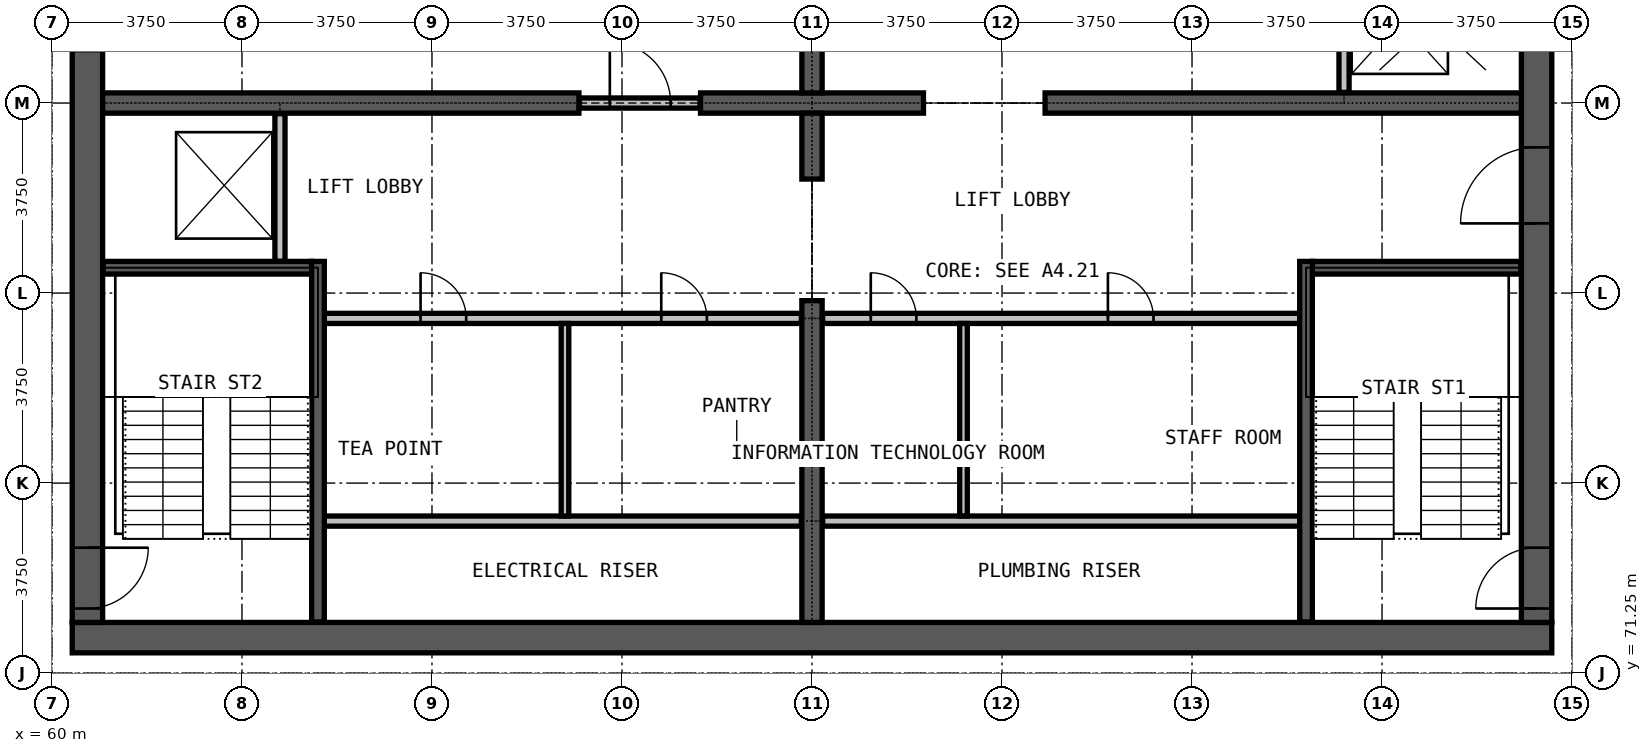
"""IFC4 building model, lengths in metres.
Left out: names, types, materials, properties, quantities, classifications, styles, units other than length and angle.
Written with IfcOpenShell. Run it as: python <this file> out.ifc"""

import sys

from ifc_helpers import new_model, si_unit, direction, frame, frame_2d, origin, place, context, subcontext, project, spatial, rectangle, extrude, element, fill, save


model = new_model("IFC4")
c1 = context("Model", 3, precision=1e-05, world=origin(), true_north=direction((0.0, 1.0)))
c2 = subcontext(c1, "Body", "Model", "MODEL_VIEW")
j1 = project(units=[si_unit("LENGTHUNIT", "METRE"), si_unit("PLANEANGLEUNIT", "RADIAN")], contexts=[c1])
p1 = place(None, origin())
s1 = spatial("IfcSite", under=j1, at=p1, CompositionType="ELEMENT")
p2 = place(p1, origin())
s2 = spatial("IfcBuilding", under=s1, at=p2, CompositionType="ELEMENT")
p3 = place(p2, frame((0.0, 0.0, 246.3)))
s3 = spatial("IfcBuildingStorey", under=s2, at=p3, CompositionType="ELEMENT", Elevation=246.3)
p4 = place(p3, frame((60.4, 71.95, 0.0), z_axis=(0.0, 0.0, 1.0), x_axis=(1.0, 0.0, 0.0)))
e1 = element("IfcWall", 1, at=p4, inside=s3, PredefinedType="SHEAR", context=c2, shape_type="SweptSolid", body=[
    extrude(rectangle(XDim=29.2, YDim=0.6, at=frame_2d((14.6, 0.0))), origin(), (0.0, 0.0, 1.0), 3.6),
])
p5 = place(p3, frame((89.3, 72.25, 0.0), z_axis=(0.0, 0.0, 1.0), x_axis=(0.0, 1.0, 0.0)))
e2 = element("IfcWall", 2, at=p5, inside=s3, PredefinedType="SHEAR", context=c2, shape_type="SweptSolid", body=[
    extrude(rectangle(XDim=20.5, YDim=0.6, at=frame_2d((10.25, 0.0))), origin(), (0.0, 0.0, 1.0), 3.6),
])
p6 = place(p5, frame((0.275, 0.0, 0.0)))
e3 = element("IfcOpeningElement", 3, at=p6, cuts=e2, PredefinedType="OPENING", context=c2, shape_type="SweptSolid", body=[
    extrude(rectangle(XDim=1.2, YDim=2.2, at=frame_2d((0.6, 1.1))), frame((0.0, 0.31, 0.0), z_axis=(0.0, -1.0, 0.0), x_axis=(1.0, 0.0, 0.0)), (0.0, 0.0, 1.0), 0.62),
])
p7 = place(p5, frame((13.775, 0.0, 0.0)))
e4 = element("IfcOpeningElement", 4, at=p7, cuts=e2, PredefinedType="OPENING", context=c2, shape_type="SweptSolid", body=[
    extrude(rectangle(XDim=1.2, YDim=2.2, at=frame_2d((0.6, 1.1))), frame((0.0, 0.31, 0.0), z_axis=(0.0, -1.0, 0.0), x_axis=(1.0, 0.0, 0.0)), (0.0, 0.0, 1.0), 0.62),
])
p8 = place(p5, frame((7.875, 0.0, 0.0)))
e5 = element("IfcOpeningElement", 5, at=p8, cuts=e2, PredefinedType="OPENING", context=c2, shape_type="SweptSolid", body=[
    extrude(rectangle(XDim=1.5, YDim=2.2, at=frame_2d((0.75, 1.1))), frame((0.0, 0.31, 0.0), z_axis=(0.0, -1.0, 0.0), x_axis=(1.0, 0.0, 0.0)), (0.0, 0.0, 1.0), 0.62),
])
p9 = place(p3, frame((60.7, 92.75, 0.0), z_axis=(0.0, 0.0, 1.0), x_axis=(0.0, -1.0, 0.0)))
e6 = element("IfcWall", 6, at=p9, inside=s3, PredefinedType="SHEAR", context=c2, shape_type="SweptSolid", body=[
    extrude(rectangle(XDim=20.5, YDim=0.6, at=frame_2d((10.25, 0.0))), origin(), (0.0, 0.0, 1.0), 3.6),
])
p10 = place(p9, frame((19.025, 0.0, 0.0)))
e7 = element("IfcOpeningElement", 7, at=p10, cuts=e6, PredefinedType="OPENING", context=c2, shape_type="SweptSolid", body=[
    extrude(rectangle(XDim=1.2, YDim=2.2, at=frame_2d((0.6, 1.1))), frame((0.0, 0.31, 0.0), z_axis=(0.0, -1.0, 0.0), x_axis=(1.0, 0.0, 0.0)), (0.0, 0.0, 1.0), 0.62),
])
p11 = place(p9, frame((8.025, 0.0, 0.0)))
e8 = element("IfcOpeningElement", 8, at=p11, cuts=e6, PredefinedType="OPENING", context=c2, shape_type="SweptSolid", body=[
    extrude(rectangle(XDim=1.2, YDim=2.2, at=frame_2d((0.6, 1.1))), frame((0.0, 0.31, 0.0), z_axis=(0.0, -1.0, 0.0), x_axis=(1.0, 0.0, 0.0)), (0.0, 0.0, 1.0), 0.62),
])
p12 = place(p3, frame((61.0, 82.5, 0.0), z_axis=(0.0, 0.0, 1.0), x_axis=(1.0, 0.0, 0.0)))
e9 = element("IfcWall", 9, at=p12, inside=s3, PredefinedType="SHEAR", context=c2, shape_type="SweptSolid", body=[
    extrude(rectangle(XDim=9.4, YDim=0.4, at=frame_2d((4.7, 0.0))), origin(), (0.0, 0.0, 1.0), 3.6),
])
p13 = place(p3, frame((72.8, 82.5, 0.0), z_axis=(0.0, 0.0, 1.0), x_axis=(1.0, 0.0, 0.0)))
e10 = element("IfcWall", 10, at=p13, inside=s3, PredefinedType="SHEAR", context=c2, shape_type="SweptSolid", body=[
    extrude(rectangle(XDim=4.4, YDim=0.4, at=frame_2d((2.2, 0.0))), origin(), (0.0, 0.0, 1.0), 3.6),
])
p14 = place(p3, frame((79.6, 82.5, 0.0), z_axis=(0.0, 0.0, 1.0), x_axis=(1.0, 0.0, 0.0)))
e11 = element("IfcWall", 11, at=p14, inside=s3, PredefinedType="SHEAR", context=c2, shape_type="SweptSolid", body=[
    extrude(rectangle(XDim=9.4, YDim=0.4, at=frame_2d((4.7, 0.0))), origin(), (0.0, 0.0, 1.0), 3.6),
])
p15 = place(p3, frame((75.0, 72.25, 0.0), z_axis=(0.0, 0.0, 1.0), x_axis=(0.0, 1.0, 0.0)))
e12 = element("IfcWall", 12, at=p15, inside=s3, PredefinedType="SHEAR", context=c2, shape_type="SweptSolid", body=[
    extrude(rectangle(XDim=6.35, YDim=0.4, at=frame_2d((3.175, 0.0))), origin(), (0.0, 0.0, 1.0), 3.6),
])
for number, where, z_axis, x_axis in (
    (13, (75.0, 81.0, 0.0), (0.0, 0.0, 1.0), (0.0, 1.0, 0.0)),
    (14, (75.0, 82.7, 0.0), (0.0, 0.0, 1.0), (0.0, 1.0, 0.0)),
):
    element("IfcWall", number, at=place(p3, frame(where, z_axis=z_axis, x_axis=x_axis)), inside=s3, PredefinedType="SHEAR", context=c2, shape_type="SweptSolid", body=[
        extrude(rectangle(XDim=1.3, YDim=0.4, at=frame_2d((0.65, 0.0))), origin(), (0.0, 0.0, 1.0), 3.6),
    ])
for number, where, z_axis, x_axis in (
    (15, (65.375, 74.25, 0.0), (0.0, 0.0, 1.0), (1.0, 0.0, 0.0)),
    (16, (75.21, 74.25, 0.0), (0.0, 0.0, 1.0), (1.0, 0.0, 0.0)),
):
    element("IfcWall", number, at=place(p3, frame(where, z_axis=z_axis, x_axis=x_axis)), inside=s3, PredefinedType="PARTITIONING", context=c2, shape_type="SweptSolid", body=[
        extrude(rectangle(XDim=9.415, YDim=0.2, at=frame_2d((4.708, 0.0))), origin(), (0.0, 0.0, 1.0), 3.3),
    ])
p16 = place(p3, frame((65.375, 78.25, 0.0), z_axis=(0.0, 0.0, 1.0), x_axis=(1.0, 0.0, 0.0)))
e17 = element("IfcWall", 17, at=p16, inside=s3, PredefinedType="PARTITIONING", context=c2, shape_type="SweptSolid", body=[
    extrude(rectangle(XDim=9.415, YDim=0.2, at=frame_2d((4.708, 0.0))), origin(), (0.0, 0.0, 1.0), 3.3),
])
p17 = place(p16, frame((1.9, 0.0, 0.0)))
e18 = element("IfcOpeningElement", 18, at=p17, cuts=e17, PredefinedType="OPENING", context=c2, shape_type="SweptSolid", body=[
    extrude(rectangle(XDim=0.9, YDim=2.2, at=frame_2d((0.45, 1.1))), frame((0.0, 0.11, 0.0), z_axis=(0.0, -1.0, 0.0), x_axis=(1.0, 0.0, 0.0)), (0.0, 0.0, 1.0), 0.22),
])
p18 = place(p16, frame((6.65, 0.0, 0.0)))
e19 = element("IfcOpeningElement", 19, at=p18, cuts=e17, PredefinedType="OPENING", context=c2, shape_type="SweptSolid", body=[
    extrude(rectangle(XDim=0.9, YDim=2.2, at=frame_2d((0.45, 1.1))), frame((0.0, 0.11, 0.0), z_axis=(0.0, -1.0, 0.0), x_axis=(1.0, 0.0, 0.0)), (0.0, 0.0, 1.0), 0.22),
])
p19 = place(p3, frame((75.21, 78.25, 0.0), z_axis=(0.0, 0.0, 1.0), x_axis=(1.0, 0.0, 0.0)))
e20 = element("IfcWall", 20, at=p19, inside=s3, PredefinedType="PARTITIONING", context=c2, shape_type="SweptSolid", body=[
    extrude(rectangle(XDim=9.415, YDim=0.2, at=frame_2d((4.708, 0.0))), origin(), (0.0, 0.0, 1.0), 3.3),
])
p20 = place(p19, frame((0.95, 0.0, 0.0)))
e21 = element("IfcOpeningElement", 21, at=p20, cuts=e20, PredefinedType="OPENING", context=c2, shape_type="SweptSolid", body=[
    extrude(rectangle(XDim=0.9, YDim=2.2, at=frame_2d((0.45, 1.1))), frame((0.0, 0.11, 0.0), z_axis=(0.0, -1.0, 0.0), x_axis=(1.0, 0.0, 0.0)), (0.0, 0.0, 1.0), 0.22),
])
p21 = place(p19, frame((5.63, 0.0, 0.0)))
e22 = element("IfcOpeningElement", 22, at=p21, cuts=e20, PredefinedType="OPENING", context=c2, shape_type="SweptSolid", body=[
    extrude(rectangle(XDim=0.9, YDim=2.2, at=frame_2d((0.45, 1.1))), frame((0.0, 0.11, 0.0), z_axis=(0.0, -1.0, 0.0), x_axis=(1.0, 0.0, 0.0)), (0.0, 0.0, 1.0), 0.22),
])
p22 = place(p3, frame((70.41, 82.5, 0.0), z_axis=(0.0, 0.0, 1.0), x_axis=(1.0, 0.0, 0.0)))
e23 = element("IfcWall", 23, at=p22, inside=s3, PredefinedType="PARTITIONING", context=c2, shape_type="SweptSolid", body=[
    extrude(rectangle(XDim=2.38, YDim=0.2, at=frame_2d((1.19, 0.0))), origin(), (0.0, 0.0, 1.0), 2.4),
])
p23 = place(p22, frame((0.6, 0.0, 0.0)))
e24 = element("IfcOpeningElement", 24, at=p23, cuts=e23, PredefinedType="OPENING", context=c2, shape_type="SweptSolid", body=[
    extrude(rectangle(XDim=1.2, YDim=2.2, at=frame_2d((0.6, 1.1))), frame((0.0, 0.11, 0.0), z_axis=(0.0, -1.0, 0.0), x_axis=(1.0, 0.0, 0.0)), (0.0, 0.0, 1.0), 0.22),
])
for number, where, z_axis, x_axis in (
    (25, (70.125, 74.35, 0.0), (0.0, 0.0, 1.0), (0.0, 1.0, 0.0)),
    (26, (77.99, 74.35, 0.0), (0.0, 0.0, 1.0), (0.0, 1.0, 0.0)),
):
    element("IfcWall", number, at=place(p3, frame(where, z_axis=z_axis, x_axis=x_axis)), inside=s3, PredefinedType="PARTITIONING", context=c2, shape_type="SweptSolid", body=[
        extrude(rectangle(XDim=3.8, YDim=0.15, at=frame_2d((1.9, 0.0))), origin(), (0.0, 0.0, 1.0), 3.3),
    ])
p24 = place(p3, frame((64.5, 79.375, 0.0), z_axis=(0.0, 0.0, 1.0), x_axis=(0.0, 1.0, 0.0)))
e27 = element("IfcWall", 27, at=p24, inside=s3, PredefinedType="PARTITIONING", context=c2, shape_type="SweptSolid", body=[
    extrude(rectangle(XDim=2.915, YDim=0.2, at=frame_2d((1.458, 0.0))), origin(), (0.0, 0.0, 1.0), 3.3),
])
p25 = place(p3, frame((85.5, 82.71, 0.0), z_axis=(0.0, 0.0, 1.0), x_axis=(0.0, 1.0, 0.0)))
e28 = element("IfcWall", 28, at=p25, inside=s3, PredefinedType="PARTITIONING", context=c2, shape_type="SweptSolid", body=[
    extrude(rectangle(XDim=2.915, YDim=0.2, at=frame_2d((1.458, 0.0))), origin(), (0.0, 0.0, 1.0), 3.3),
])
p26 = place(p25, frame((0.9, 0.0, 0.0)))
e29 = element("IfcOpeningElement", 29, at=p26, cuts=e28, PredefinedType="OPENING", context=c2, shape_type="SweptSolid", body=[
    extrude(rectangle(XDim=1.1, YDim=2.2, at=frame_2d((0.55, 1.1))), frame((0.0, 0.11, 0.0), z_axis=(0.0, -1.0, 0.0), x_axis=(1.0, 0.0, 0.0)), (0.0, 0.0, 1.0), 0.22),
])
for number, where, z_axis, x_axis in (
    (30, (61.01, 79.25, 0.0), (0.0, 0.0, 1.0), (1.0, 0.0, 0.0)),
    (31, (84.875, 79.25, 0.0), (0.0, 0.0, 1.0), (1.0, 0.0, 0.0)),
):
    element("IfcWall", number, at=place(p3, frame(where, z_axis=z_axis, x_axis=x_axis)), inside=s3, PredefinedType="PARTITIONING", context=c2, shape_type="SweptSolid", body=[
        extrude(rectangle(XDim=4.115, YDim=0.25, at=frame_2d((2.058, 0.0))), origin(), (0.0, 0.0, 1.0), 3.3),
    ])
for number, where, z_axis, x_axis in (
    (32, (65.25, 72.26, 0.0), (0.0, 0.0, 1.0), (0.0, 1.0, 0.0)),
    (33, (84.75, 72.26, 0.0), (0.0, 0.0, 1.0), (0.0, 1.0, 0.0)),
):
    element("IfcWall", number, at=place(p3, frame(where, z_axis=z_axis, x_axis=x_axis)), inside=s3, PredefinedType="PARTITIONING", context=c2, shape_type="SweptSolid", body=[
        extrude(rectangle(XDim=7.115, YDim=0.25, at=frame_2d((3.558, 0.0))), origin(), (0.0, 0.0, 1.0), 3.3),
    ])
p27 = place(p23, origin())
e34 = element("IfcDoor", 34, at=p27, inside=s3, OperationType="SINGLE_SWING_LEFT", PredefinedType="DOOR", context=c2, shape_type="SweptSolid", body=[
    extrude(rectangle(XDim=1.2, YDim=2.2, at=frame_2d((0.6, 1.1))), frame((0.0, 0.025, 0.0), z_axis=(0.0, -1.0, 0.0), x_axis=(1.0, 0.0, 0.0)), (0.0, 0.0, 1.0), 0.05),
])
fill(e24, e34)
p28 = place(p6, origin())
e35 = element("IfcDoor", 35, at=p28, inside=s3, OperationType="SINGLE_SWING_LEFT", PredefinedType="DOOR", context=c2, shape_type="SweptSolid", body=[
    extrude(rectangle(XDim=1.2, YDim=2.2, at=frame_2d((0.6, 1.1))), frame((0.0, 0.025, 0.0), z_axis=(0.0, -1.0, 0.0), x_axis=(1.0, 0.0, 0.0)), (0.0, 0.0, 1.0), 0.05),
])
fill(e3, e35)
p29 = place(p10, origin())
e36 = element("IfcDoor", 36, at=p29, inside=s3, OperationType="SINGLE_SWING_RIGHT", PredefinedType="DOOR", context=c2, shape_type="SweptSolid", body=[
    extrude(rectangle(XDim=1.2, YDim=2.2, at=frame_2d((0.6, 1.1))), frame((0.0, 0.025, 0.0), z_axis=(0.0, -1.0, 0.0), x_axis=(1.0, 0.0, 0.0)), (0.0, 0.0, 1.0), 0.05),
])
fill(e7, e36)
p30 = place(p8, origin())
e37 = element("IfcDoor", 37, at=p30, inside=s3, OperationType="DOUBLE_DOOR_SINGLE_SWING", PredefinedType="DOOR", context=c2, shape_type="SweptSolid", body=[
    extrude(rectangle(XDim=1.5, YDim=2.2, at=frame_2d((0.75, 1.1))), frame((0.0, 0.025, 0.0), z_axis=(0.0, -1.0, 0.0), x_axis=(1.0, 0.0, 0.0)), (0.0, 0.0, 1.0), 0.05),
])
fill(e5, e37)
p31 = place(p17, origin())
e38 = element("IfcDoor", 38, at=p31, inside=s3, OperationType="SINGLE_SWING_RIGHT", PredefinedType="DOOR", context=c2, shape_type="SweptSolid", body=[
    extrude(rectangle(XDim=0.9, YDim=2.2, at=frame_2d((0.45, 1.1))), frame((0.0, 0.025, 0.0), z_axis=(0.0, -1.0, 0.0), x_axis=(1.0, 0.0, 0.0)), (0.0, 0.0, 1.0), 0.05),
])
fill(e18, e38)
p32 = place(p18, origin())
e39 = element("IfcDoor", 39, at=p32, inside=s3, OperationType="SINGLE_SWING_RIGHT", PredefinedType="DOOR", context=c2, shape_type="SweptSolid", body=[
    extrude(rectangle(XDim=0.9, YDim=2.2, at=frame_2d((0.45, 1.1))), frame((0.0, 0.025, 0.0), z_axis=(0.0, -1.0, 0.0), x_axis=(1.0, 0.0, 0.0)), (0.0, 0.0, 1.0), 0.05),
])
fill(e19, e39)
p33 = place(p20, origin())
e40 = element("IfcDoor", 40, at=p33, inside=s3, OperationType="SINGLE_SWING_LEFT", PredefinedType="DOOR", context=c2, shape_type="SweptSolid", body=[
    extrude(rectangle(XDim=0.9, YDim=2.2, at=frame_2d((0.45, 1.1))), frame((0.0, 0.025, 0.0), z_axis=(0.0, -1.0, 0.0), x_axis=(1.0, 0.0, 0.0)), (0.0, 0.0, 1.0), 0.05),
])
fill(e21, e40)
p34 = place(p21, origin())
e41 = element("IfcDoor", 41, at=p34, inside=s3, OperationType="SINGLE_SWING_LEFT", PredefinedType="DOOR", context=c2, shape_type="SweptSolid", body=[
    extrude(rectangle(XDim=0.9, YDim=2.2, at=frame_2d((0.45, 1.1))), frame((0.0, 0.025, 0.0), z_axis=(0.0, -1.0, 0.0), x_axis=(1.0, 0.0, 0.0)), (0.0, 0.0, 1.0), 0.05),
])
fill(e22, e41)
save(model, sys.argv[1])
